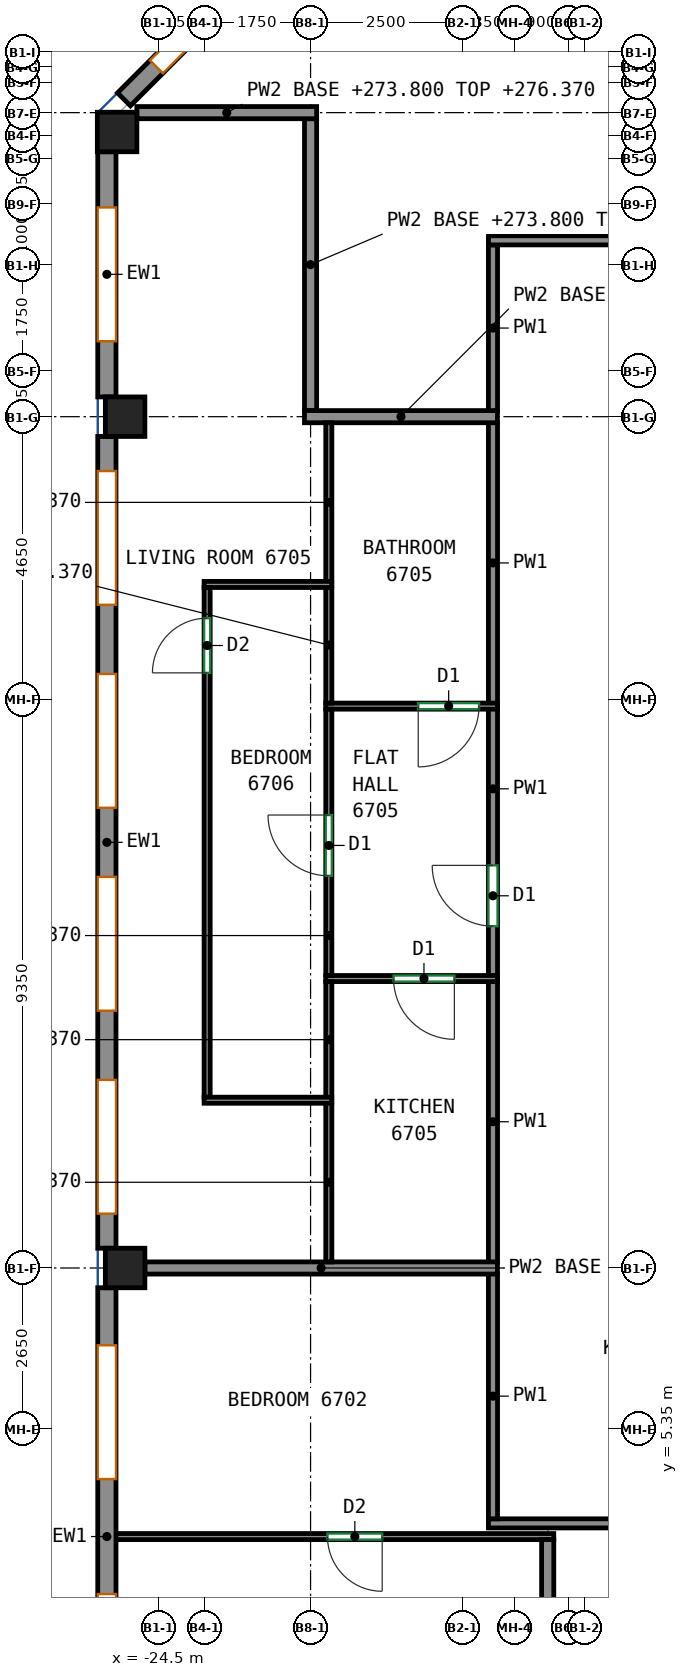
"""IFC4 building model, lengths in metres.
Left out: names, types, materials, properties, quantities, classifications, styles, units other than length and angle.
Written with IfcOpenShell. Run it as: python <this file> out.ifc"""

import sys

from ifc_helpers import new_model, si_unit, direction, frame, frame_2d, origin, origin_2d, place, context, subcontext, project, spatial, rectangle, extrude, source, transform, mapped, element, fill, save


model = new_model("IFC4")
c1 = context("Model", 3, precision=1e-05, world=origin(), true_north=direction((0.0, 1.0)))
c2 = subcontext(c1, "Body", "Model", "MODEL_VIEW")
j1 = project(units=[si_unit("LENGTHUNIT", "METRE"), si_unit("PLANEANGLEUNIT", "RADIAN")], contexts=[c1])
p1 = place(None, origin())
s1 = spatial("IfcSite", under=j1, at=p1, CompositionType="ELEMENT")
p2 = place(p1, origin())
s2 = spatial("IfcBuilding", under=s1, at=p2, CompositionType="ELEMENT")
p3 = place(p2, frame((0.0, 0.0, 273.8)))
s3 = spatial("IfcBuildingStorey", under=s2, at=p3, CompositionType="ELEMENT", Elevation=273.8)
m1 = source(origin(), c2, "Body", "SweptSolid", [
    extrude(rectangle(XDim=0.65, YDim=0.65, at=origin_2d()), origin(), (0.0, 0.0, 1.0), 3.12),
])
for number, where, z_axis, x_axis in (
    (1, (-25.182, 26.682, 0.0), (0.0, 0.0, 1.0), (1.0, 0.0, 0.0)),
    (2, (-25.05, 8.0, 0.0), (0.0, 0.0, 1.0), (1.0, 0.0, 0.0)),
    (3, (-25.05, 22.0, 0.0), (0.0, 0.0, 1.0), (1.0, 0.0, 0.0)),
):
    element("IfcColumn", number, at=place(p3, frame(where, z_axis=z_axis, x_axis=x_axis)), inside=s3, PredefinedType="COLUMN", context=c2, shape_type="MappedRepresentation", body=[
        mapped(m1, transform((0.0, 0.0, 0.0))),
    ])
m2 = source(origin(), c2, "Body", "SweptSolid", [
    extrude(rectangle(XDim=3.712, YDim=0.3, at=frame_2d((1.856, 0.0))), origin(), (0.0, 0.0, 1.0), 3.12),
])
p4 = place(p3, frame((-22.444, 29.844, 0.0), z_axis=(0.0, 0.0, 1.0), x_axis=(-0.707106781187, -0.707106781187, 0.0)))
e4 = element("IfcWall", 4, at=p4, inside=s3, PredefinedType="SOLIDWALL", context=c2, shape_type="MappedRepresentation", body=[
    mapped(m2, transform((0.0, 0.0, 0.0))),
])
p5 = place(p4, frame((0.756, 0.0, 0.8)))
e5 = element("IfcOpeningElement", 5, at=p5, cuts=e4, PredefinedType="OPENING", context=c2, shape_type="SweptSolid", body=[
    extrude(rectangle(XDim=2.2, YDim=2.05, at=frame_2d((1.1, 1.025))), frame((0.0, 0.16, 0.0), z_axis=(0.0, -1.0, 0.0), x_axis=(1.0, 0.0, 0.0)), (0.0, 0.0, 1.0), 0.32),
])
m3 = source(origin(), c2, "Body", "SweptSolid", [
    extrude(rectangle(XDim=4.032, YDim=0.3, at=frame_2d((2.016, 0.0))), origin(), (0.0, 0.0, 1.0), 3.12),
])
p6 = place(p3, frame((-25.35, 26.357, 0.0), z_axis=(0.0, 0.0, 1.0), x_axis=(0.0, -1.0, 0.0)))
e6 = element("IfcWall", 6, at=p6, inside=s3, PredefinedType="SOLIDWALL", context=c2, shape_type="MappedRepresentation", body=[
    mapped(m3, transform((0.0, 0.0, 0.0))),
])
p7 = place(p6, frame((0.916, 0.0, 0.8)))
e7 = element("IfcOpeningElement", 7, at=p7, cuts=e6, PredefinedType="OPENING", context=c2, shape_type="SweptSolid", body=[
    extrude(rectangle(XDim=2.2, YDim=2.05, at=frame_2d((1.1, 1.025))), frame((0.0, 0.16, 0.0), z_axis=(0.0, -1.0, 0.0), x_axis=(1.0, 0.0, 0.0)), (0.0, 0.0, 1.0), 0.32),
])
m4 = source(origin(), c2, "Body", "SweptSolid", [
    extrude(rectangle(XDim=13.35, YDim=0.3, at=frame_2d((6.675, 0.0))), origin(), (0.0, 0.0, 1.0), 3.12),
])
p8 = place(p3, frame((-25.35, 21.675, 0.0), z_axis=(0.0, 0.0, 1.0), x_axis=(0.0, -1.0, 0.0)))
e8 = element("IfcWall", 8, at=p8, inside=s3, PredefinedType="SOLIDWALL", context=c2, shape_type="MappedRepresentation", body=[
    mapped(m4, transform((0.0, 0.0, 0.0))),
])
p9 = place(p8, frame((0.569, 0.0, 0.8)))
e9 = element("IfcOpeningElement", 9, at=p9, cuts=e8, PredefinedType="OPENING", context=c2, shape_type="SweptSolid", body=[
    extrude(rectangle(XDim=2.2, YDim=2.05, at=frame_2d((1.1, 1.025))), frame((0.0, 0.16, 0.0), z_axis=(0.0, -1.0, 0.0), x_axis=(1.0, 0.0, 0.0)), (0.0, 0.0, 1.0), 0.32),
])
p10 = place(p8, frame((3.906, 0.0, 0.8)))
e10 = element("IfcOpeningElement", 10, at=p10, cuts=e8, PredefinedType="OPENING", context=c2, shape_type="SweptSolid", body=[
    extrude(rectangle(XDim=2.2, YDim=2.05, at=frame_2d((1.1, 1.025))), frame((0.0, 0.16, 0.0), z_axis=(0.0, -1.0, 0.0), x_axis=(1.0, 0.0, 0.0)), (0.0, 0.0, 1.0), 0.32),
])
p11 = place(p8, frame((7.244, 0.0, 0.8)))
e11 = element("IfcOpeningElement", 11, at=p11, cuts=e8, PredefinedType="OPENING", context=c2, shape_type="SweptSolid", body=[
    extrude(rectangle(XDim=2.2, YDim=2.05, at=frame_2d((1.1, 1.025))), frame((0.0, 0.16, 0.0), z_axis=(0.0, -1.0, 0.0), x_axis=(1.0, 0.0, 0.0)), (0.0, 0.0, 1.0), 0.32),
])
p12 = place(p8, frame((10.581, 0.0, 0.8)))
e12 = element("IfcOpeningElement", 12, at=p12, cuts=e8, PredefinedType="OPENING", context=c2, shape_type="SweptSolid", body=[
    extrude(rectangle(XDim=2.2, YDim=2.05, at=frame_2d((1.1, 1.025))), frame((0.0, 0.16, 0.0), z_axis=(0.0, -1.0, 0.0), x_axis=(1.0, 0.0, 0.0)), (0.0, 0.0, 1.0), 0.32),
])
m5 = source(origin(), c2, "Body", "SweptSolid", [
    extrude(rectangle(XDim=8.183, YDim=0.3, at=frame_2d((4.092, 0.0))), origin(), (0.0, 0.0, 1.0), 3.12),
])
p13 = place(p3, frame((-25.35, 7.675, 0.0), z_axis=(0.0, 0.0, 1.0), x_axis=(0.0, -1.0, 0.0)))
e13 = element("IfcWall", 13, at=p13, inside=s3, PredefinedType="SOLIDWALL", context=c2, shape_type="MappedRepresentation", body=[
    mapped(m5, transform((0.0, 0.0, 0.0))),
])
p14 = place(p13, frame((0.946, 0.0, 0.8)))
e14 = element("IfcOpeningElement", 14, at=p14, cuts=e13, PredefinedType="OPENING", context=c2, shape_type="SweptSolid", body=[
    extrude(rectangle(XDim=2.2, YDim=2.05, at=frame_2d((1.1, 1.025))), frame((0.0, 0.16, 0.0), z_axis=(0.0, -1.0, 0.0), x_axis=(1.0, 0.0, 0.0)), (0.0, 0.0, 1.0), 0.32),
])
p15 = place(p13, frame((5.037, 0.0, 0.8)))
e15 = element("IfcOpeningElement", 15, at=p15, cuts=e13, PredefinedType="OPENING", context=c2, shape_type="SweptSolid", body=[
    extrude(rectangle(XDim=2.2, YDim=2.05, at=frame_2d((1.1, 1.025))), frame((0.0, 0.16, 0.0), z_axis=(0.0, -1.0, 0.0), x_axis=(1.0, 0.0, 0.0)), (0.0, 0.0, 1.0), 0.32),
])
p16 = place(p3, frame((-19.075, 3.8, 0.0), z_axis=(0.0, 0.0, 1.0), x_axis=(1.0, 0.0, 0.0)))
e16 = element("IfcWall", 16, at=p16, inside=s3, PredefinedType="PARTITIONING", context=c2, shape_type="SweptSolid", body=[
    extrude(rectangle(XDim=4.89, YDim=0.15, at=frame_2d((2.445, 0.0))), origin(), (0.0, 0.0, 1.0), 3.12),
])
p17 = place(p3, frame((-19.0, 3.875, 0.0), z_axis=(0.0, 0.0, 1.0), x_axis=(0.0, 1.0, 0.0)))
e17 = element("IfcWall", 17, at=p17, inside=s3, PredefinedType="PARTITIONING", context=c2, shape_type="SweptSolid", body=[
    extrude(rectangle(XDim=4.035, YDim=0.15, at=frame_2d((2.018, 0.0))), origin(), (0.0, 0.0, 1.0), 3.12),
])
p18 = place(p3, frame((-19.0, 22.09, 0.0), z_axis=(0.0, 0.0, 1.0), x_axis=(0.0, 1.0, 0.0)))
e18 = element("IfcWall", 18, at=p18, inside=s3, PredefinedType="PARTITIONING", context=c2, shape_type="SweptSolid", body=[
    extrude(rectangle(XDim=2.735, YDim=0.15, at=frame_2d((1.367, 0.0))), origin(), (0.0, 0.0, 1.0), 3.12),
])
p19 = place(p3, frame((-19.075, 24.9, 0.0), z_axis=(0.0, 0.0, 1.0), x_axis=(1.0, 0.0, 0.0)))
e19 = element("IfcWall", 19, at=p19, inside=s3, PredefinedType="PARTITIONING", context=c2, shape_type="SweptSolid", body=[
    extrude(rectangle(XDim=39.75, YDim=0.15, at=frame_2d((19.875, 0.0))), origin(), (0.0, 0.0, 1.0), 3.12),
])
p20 = place(p19, frame((8.674, 0.0, 0.0)))
e20 = element("IfcOpeningElement", 20, at=p20, cuts=e19, PredefinedType="OPENING", context=c2, shape_type="SweptSolid", body=[
    extrude(rectangle(XDim=0.9, YDim=2.1, at=frame_2d((0.45, 1.05))), frame((0.0, 0.085, 0.0), z_axis=(0.0, -1.0, 0.0), x_axis=(1.0, 0.0, 0.0)), (0.0, 0.0, 1.0), 0.17),
])
p21 = place(p19, frame((13.778, 0.0, 0.0)))
e21 = element("IfcOpeningElement", 21, at=p21, cuts=e19, PredefinedType="OPENING", context=c2, shape_type="SweptSolid", body=[
    extrude(rectangle(XDim=0.9, YDim=2.1, at=frame_2d((0.45, 1.05))), frame((0.0, 0.085, 0.0), z_axis=(0.0, -1.0, 0.0), x_axis=(1.0, 0.0, 0.0)), (0.0, 0.0, 1.0), 0.17),
])
p22 = place(p3, frame((-19.0, 8.09, 0.0), z_axis=(0.0, 0.0, 1.0), x_axis=(0.0, 1.0, 0.0)))
e22 = element("IfcWall", 22, at=p22, inside=s3, PredefinedType="PARTITIONING", context=c2, shape_type="SweptSolid", body=[
    extrude(rectangle(XDim=4.63, YDim=0.15, at=frame_2d((2.315, 0.0))), origin(), (0.0, 0.0, 1.0), 3.12),
])
p23 = place(p3, frame((-19.0, 12.8, 0.0), z_axis=(0.0, 0.0, 1.0), x_axis=(0.0, 1.0, 0.0)))
e23 = element("IfcWall", 23, at=p23, inside=s3, PredefinedType="PARTITIONING", context=c2, shape_type="SweptSolid", body=[
    extrude(rectangle(XDim=4.4, YDim=0.15, at=frame_2d((2.2, 0.0))), origin(), (0.0, 0.0, 1.0), 3.12),
])
p24 = place(p23, frame((0.821, 0.0, 0.0)))
e24 = element("IfcOpeningElement", 24, at=p24, cuts=e23, PredefinedType="OPENING", context=c2, shape_type="SweptSolid", body=[
    extrude(rectangle(XDim=1.0, YDim=2.1, at=frame_2d((0.5, 1.05))), frame((0.0, 0.085, 0.0), z_axis=(0.0, -1.0, 0.0), x_axis=(1.0, 0.0, 0.0)), (0.0, 0.0, 1.0), 0.17),
])
p25 = place(p3, frame((-19.0, 17.28, 0.0), z_axis=(0.0, 0.0, 1.0), x_axis=(0.0, 1.0, 0.0)))
e25 = element("IfcWall", 25, at=p25, inside=s3, PredefinedType="PARTITIONING", context=c2, shape_type="SweptSolid", body=[
    extrude(rectangle(XDim=4.63, YDim=0.15, at=frame_2d((2.315, 0.0))), origin(), (0.0, 0.0, 1.0), 3.12),
])
p26 = place(p3, frame((-18.0, 3.583, 0.0), z_axis=(0.0, 0.0, 1.0), x_axis=(-1.0, 0.0, 0.0)))
e26 = element("IfcWall", 26, at=p26, inside=s3, PredefinedType="PARTITIONING", context=c2, shape_type="SweptSolid", body=[
    extrude(rectangle(XDim=7.25, YDim=0.1, at=frame_2d((3.625, 0.0))), origin(), (0.0, 0.0, 1.0), 3.12),
])
p27 = place(p26, frame((2.822, 0.0, 0.0)))
e27 = element("IfcOpeningElement", 27, at=p27, cuts=e26, PredefinedType="OPENING", context=c2, shape_type="SweptSolid", body=[
    extrude(rectangle(XDim=0.9, YDim=2.1, at=frame_2d((0.45, 1.05))), frame((0.0, 0.06, 0.0), z_axis=(0.0, -1.0, 0.0), x_axis=(1.0, 0.0, 0.0)), (0.0, 0.0, 1.0), 0.12),
])
p28 = place(p3, frame((-18.1, -3.148, 0.0), z_axis=(0.0, 0.0, 1.0), x_axis=(0.0, 1.0, 0.0)))
e28 = element("IfcWall", 28, at=p28, inside=s3, PredefinedType="PARTITIONING", context=c2, shape_type="SweptSolid", body=[
    extrude(rectangle(XDim=6.681, YDim=0.2, at=frame_2d((3.34, 0.0))), origin(), (0.0, 0.0, 1.0), 3.12),
])
p29 = place(p3, frame((-24.725, 8.0, 0.0), z_axis=(0.0, 0.0, 1.0), x_axis=(1.0, 0.0, 0.0)))
e29 = element("IfcWall", 29, at=p29, inside=s3, PredefinedType="PARTITIONING", context=c2, shape_type="SweptSolid", body=[
    extrude(rectangle(XDim=5.798, YDim=0.2, at=frame_2d((2.899, 0.0))), origin(), (0.0, 0.0, 1.0), 2.57),
])
p30 = place(p3, frame((-22.0, 22.1, 0.0), z_axis=(0.0, 0.0, 1.0), x_axis=(0.0, 1.0, 0.0)))
e30 = element("IfcWall", 30, at=p30, inside=s3, PredefinedType="PARTITIONING", context=c2, shape_type="SweptSolid", body=[
    extrude(rectangle(XDim=4.8, YDim=0.2, at=frame_2d((2.4, 0.0))), origin(), (0.0, 0.0, 1.0), 2.57),
])
p31 = place(p3, frame((-24.857, 27.0, 0.0), z_axis=(0.0, 0.0, 1.0), x_axis=(1.0, 0.0, 0.0)))
e31 = element("IfcWall", 31, at=p31, inside=s3, PredefinedType="PARTITIONING", context=c2, shape_type="SweptSolid", body=[
    extrude(rectangle(XDim=2.957, YDim=0.2, at=frame_2d((1.479, 0.0))), origin(), (0.0, 0.0, 1.0), 2.57),
])
p32 = place(p3, frame((-22.1, 22.0, 0.0), z_axis=(0.0, 0.0, 1.0), x_axis=(1.0, 0.0, 0.0)))
e32 = element("IfcWall", 32, at=p32, inside=s3, PredefinedType="PARTITIONING", context=c2, shape_type="SweptSolid", body=[
    extrude(rectangle(XDim=3.173, YDim=0.2, at=frame_2d((1.586, 0.0))), origin(), (0.0, 0.0, 1.0), 2.57),
])
p33 = place(p3, frame((-18.927, 12.76, 0.0), z_axis=(0.0, 0.0, 1.0), x_axis=(-1.0, 0.0, 0.0)))
e33 = element("IfcWall", 33, at=p33, inside=s3, PredefinedType="PARTITIONING", context=c2, shape_type="SweptSolid", body=[
    extrude(rectangle(XDim=2.823, YDim=0.1, at=frame_2d((1.412, 0.0))), origin(), (0.0, 0.0, 1.0), 3.12),
])
p34 = place(p33, frame((0.708, 0.0, 0.0)))
e34 = element("IfcOpeningElement", 34, at=p34, cuts=e33, PredefinedType="OPENING", context=c2, shape_type="SweptSolid", body=[
    extrude(rectangle(XDim=1.0, YDim=2.1, at=frame_2d((0.5, 1.05))), frame((0.0, 0.06, 0.0), z_axis=(0.0, -1.0, 0.0), x_axis=(1.0, 0.0, 0.0)), (0.0, 0.0, 1.0), 0.12),
])
p35 = place(p3, frame((-21.7, 8.1, 0.0), z_axis=(0.0, 0.0, 1.0), x_axis=(0.0, 1.0, 0.0)))
e35 = element("IfcWall", 35, at=p35, inside=s3, PredefinedType="PARTITIONING", context=c2, shape_type="SweptSolid", body=[
    extrude(rectangle(XDim=2.619, YDim=0.1, at=frame_2d((1.31, 0.0))), origin(), (0.0, 0.0, 1.0), 2.57),
])
p36 = place(p3, frame((-21.7, 10.8, 0.0), z_axis=(0.0, 0.0, 1.0), x_axis=(0.0, 1.0, 0.0)))
e36 = element("IfcWall", 36, at=p36, inside=s3, PredefinedType="PARTITIONING", context=c2, shape_type="SweptSolid", body=[
    extrude(rectangle(XDim=1.91, YDim=0.1, at=frame_2d((0.955, 0.0))), origin(), (0.0, 0.0, 1.0), 2.57),
])
p37 = place(p3, frame((-18.927, 17.24, 0.0), z_axis=(0.0, 0.0, 1.0), x_axis=(-1.0, 0.0, 0.0)))
e37 = element("IfcWall", 37, at=p37, inside=s3, PredefinedType="PARTITIONING", context=c2, shape_type="SweptSolid", body=[
    extrude(rectangle(XDim=2.823, YDim=0.1, at=frame_2d((1.412, 0.0))), origin(), (0.0, 0.0, 1.0), 3.12),
])
p38 = place(p37, frame((0.302, 0.0, 0.0)))
e38 = element("IfcOpeningElement", 38, at=p38, cuts=e37, PredefinedType="OPENING", context=c2, shape_type="SweptSolid", body=[
    extrude(rectangle(XDim=1.0, YDim=2.1, at=frame_2d((0.5, 1.05))), frame((0.0, 0.06, 0.0), z_axis=(0.0, -1.0, 0.0), x_axis=(1.0, 0.0, 0.0)), (0.0, 0.0, 1.0), 0.12),
])
p39 = place(p3, frame((-21.7, 12.81, 0.0), z_axis=(0.0, 0.0, 1.0), x_axis=(0.0, 1.0, 0.0)))
e39 = element("IfcWall", 39, at=p39, inside=s3, PredefinedType="PARTITIONING", context=c2, shape_type="SweptSolid", body=[
    extrude(rectangle(XDim=4.38, YDim=0.1, at=frame_2d((2.19, 0.0))), origin(), (0.0, 0.0, 1.0), 2.57),
])
p40 = place(p39, frame((1.639, 0.0, 0.0)))
e40 = element("IfcOpeningElement", 40, at=p40, cuts=e39, PredefinedType="OPENING", context=c2, shape_type="SweptSolid", body=[
    extrude(rectangle(XDim=1.0, YDim=2.1, at=frame_2d((0.5, 1.05))), frame((0.0, 0.06, 0.0), z_axis=(0.0, -1.0, 0.0), x_axis=(1.0, 0.0, 0.0)), (0.0, 0.0, 1.0), 0.12),
])
p41 = place(p3, frame((-21.7, 19.281, 0.0), z_axis=(0.0, 0.0, 1.0), x_axis=(0.0, 1.0, 0.0)))
e41 = element("IfcWall", 41, at=p41, inside=s3, PredefinedType="PARTITIONING", context=c2, shape_type="SweptSolid", body=[
    extrude(rectangle(XDim=2.619, YDim=0.1, at=frame_2d((1.31, 0.0))), origin(), (0.0, 0.0, 1.0), 2.57),
])
p42 = place(p3, frame((-21.7, 17.29, 0.0), z_axis=(0.0, 0.0, 1.0), x_axis=(0.0, 1.0, 0.0)))
e42 = element("IfcWall", 42, at=p42, inside=s3, PredefinedType="PARTITIONING", context=c2, shape_type="SweptSolid", body=[
    extrude(rectangle(XDim=1.91, YDim=0.1, at=frame_2d((0.955, 0.0))), origin(), (0.0, 0.0, 1.0), 2.57),
])
p43 = place(p3, frame((-23.751, 19.241, 0.0), z_axis=(0.0, 0.0, 1.0), x_axis=(1.0, 0.0, 0.0)))
e43 = element("IfcWall", 43, at=p43, inside=s3, PredefinedType="PARTITIONING", context=c2, shape_type="SweptSolid", body=[
    extrude(rectangle(XDim=2.099, YDim=0.1, at=frame_2d((1.049, 0.0))), origin(), (0.0, 0.0, 1.0), 3.12),
])
p44 = place(p3, frame((-23.701, 10.809, 0.0), z_axis=(0.0, 0.0, 1.0), x_axis=(0.0, 1.0, 0.0)))
e44 = element("IfcWall", 44, at=p44, inside=s3, PredefinedType="PARTITIONING", context=c2, shape_type="SweptSolid", body=[
    extrude(rectangle(XDim=8.382, YDim=0.1, at=frame_2d((4.191, 0.0))), origin(), (0.0, 0.0, 1.0), 3.12),
])
p45 = place(p44, frame((6.978, 0.0, 0.0)))
e45 = element("IfcOpeningElement", 45, at=p45, cuts=e44, PredefinedType="OPENING", context=c2, shape_type="SweptSolid", body=[
    extrude(rectangle(XDim=0.9, YDim=2.1, at=frame_2d((0.45, 1.05))), frame((0.0, 0.06, 0.0), z_axis=(0.0, -1.0, 0.0), x_axis=(1.0, 0.0, 0.0)), (0.0, 0.0, 1.0), 0.12),
])
p46 = place(p3, frame((-21.652, 10.759, 0.0), z_axis=(0.0, 0.0, 1.0), x_axis=(-1.0, 0.0, 0.0)))
e46 = element("IfcWall", 46, at=p46, inside=s3, PredefinedType="PARTITIONING", context=c2, shape_type="SweptSolid", body=[
    extrude(rectangle(XDim=2.099, YDim=0.1, at=frame_2d((1.049, 0.0))), origin(), (0.0, 0.0, 1.0), 3.12),
])
p47 = place(p5, origin())
e47 = element("IfcWindow", 47, at=p47, inside=s3, PartitioningType="SINGLE_PANEL", PredefinedType="WINDOW", context=c2, shape_type="SweptSolid", body=[
    extrude(rectangle(XDim=2.2, YDim=2.05, at=frame_2d((1.1, 1.025))), frame((0.0, 0.03, 0.0), z_axis=(0.0, -1.0, 0.0), x_axis=(1.0, 0.0, 0.0)), (0.0, 0.0, 1.0), 0.06),
])
fill(e5, e47)
p48 = place(p7, origin())
e48 = element("IfcWindow", 48, at=p48, inside=s3, PartitioningType="SINGLE_PANEL", PredefinedType="WINDOW", context=c2, shape_type="SweptSolid", body=[
    extrude(rectangle(XDim=2.2, YDim=2.05, at=frame_2d((1.1, 1.025))), frame((0.0, 0.03, 0.0), z_axis=(0.0, -1.0, 0.0), x_axis=(1.0, 0.0, 0.0)), (0.0, 0.0, 1.0), 0.06),
])
fill(e7, e48)
p49 = place(p9, origin())
e49 = element("IfcWindow", 49, at=p49, inside=s3, PartitioningType="SINGLE_PANEL", PredefinedType="WINDOW", context=c2, shape_type="SweptSolid", body=[
    extrude(rectangle(XDim=2.2, YDim=2.05, at=frame_2d((1.1, 1.025))), frame((0.0, 0.03, 0.0), z_axis=(0.0, -1.0, 0.0), x_axis=(1.0, 0.0, 0.0)), (0.0, 0.0, 1.0), 0.06),
])
fill(e9, e49)
p50 = place(p10, origin())
e50 = element("IfcWindow", 50, at=p50, inside=s3, PartitioningType="SINGLE_PANEL", PredefinedType="WINDOW", context=c2, shape_type="SweptSolid", body=[
    extrude(rectangle(XDim=2.2, YDim=2.05, at=frame_2d((1.1, 1.025))), frame((0.0, 0.03, 0.0), z_axis=(0.0, -1.0, 0.0), x_axis=(1.0, 0.0, 0.0)), (0.0, 0.0, 1.0), 0.06),
])
fill(e10, e50)
p51 = place(p11, origin())
e51 = element("IfcWindow", 51, at=p51, inside=s3, PartitioningType="SINGLE_PANEL", PredefinedType="WINDOW", context=c2, shape_type="SweptSolid", body=[
    extrude(rectangle(XDim=2.2, YDim=2.05, at=frame_2d((1.1, 1.025))), frame((0.0, 0.03, 0.0), z_axis=(0.0, -1.0, 0.0), x_axis=(1.0, 0.0, 0.0)), (0.0, 0.0, 1.0), 0.06),
])
fill(e11, e51)
p52 = place(p12, origin())
e52 = element("IfcWindow", 52, at=p52, inside=s3, PartitioningType="SINGLE_PANEL", PredefinedType="WINDOW", context=c2, shape_type="SweptSolid", body=[
    extrude(rectangle(XDim=2.2, YDim=2.05, at=frame_2d((1.1, 1.025))), frame((0.0, 0.03, 0.0), z_axis=(0.0, -1.0, 0.0), x_axis=(1.0, 0.0, 0.0)), (0.0, 0.0, 1.0), 0.06),
])
fill(e12, e52)
p53 = place(p14, origin())
e53 = element("IfcWindow", 53, at=p53, inside=s3, PartitioningType="SINGLE_PANEL", PredefinedType="WINDOW", context=c2, shape_type="SweptSolid", body=[
    extrude(rectangle(XDim=2.2, YDim=2.05, at=frame_2d((1.1, 1.025))), frame((0.0, 0.03, 0.0), z_axis=(0.0, -1.0, 0.0), x_axis=(1.0, 0.0, 0.0)), (0.0, 0.0, 1.0), 0.06),
])
fill(e14, e53)
p54 = place(p15, origin())
e54 = element("IfcWindow", 54, at=p54, inside=s3, PartitioningType="SINGLE_PANEL", PredefinedType="WINDOW", context=c2, shape_type="SweptSolid", body=[
    extrude(rectangle(XDim=2.2, YDim=2.05, at=frame_2d((1.1, 1.025))), frame((0.0, 0.03, 0.0), z_axis=(0.0, -1.0, 0.0), x_axis=(1.0, 0.0, 0.0)), (0.0, 0.0, 1.0), 0.06),
])
fill(e15, e54)
p55 = place(p27, origin())
e55 = element("IfcDoor", 55, at=p55, inside=s3, OperationType="SINGLE_SWING_LEFT", PredefinedType="DOOR", context=c2, shape_type="SweptSolid", body=[
    extrude(rectangle(XDim=0.9, YDim=2.1, at=frame_2d((0.45, 1.05))), frame((0.0, 0.025, 0.0), z_axis=(0.0, -1.0, 0.0), x_axis=(1.0, 0.0, 0.0)), (0.0, 0.0, 1.0), 0.05),
])
fill(e27, e55)
p56 = place(p34, origin())
e56 = element("IfcDoor", 56, at=p56, inside=s3, OperationType="SINGLE_SWING_LEFT", PredefinedType="DOOR", context=c2, shape_type="SweptSolid", body=[
    extrude(rectangle(XDim=1.0, YDim=2.1, at=frame_2d((0.5, 1.05))), frame((0.0, 0.025, 0.0), z_axis=(0.0, -1.0, 0.0), x_axis=(1.0, 0.0, 0.0)), (0.0, 0.0, 1.0), 0.05),
])
fill(e34, e56)
p57 = place(p24, origin())
e57 = element("IfcDoor", 57, at=p57, inside=s3, OperationType="SINGLE_SWING_RIGHT", PredefinedType="DOOR", context=c2, shape_type="SweptSolid", body=[
    extrude(rectangle(XDim=1.0, YDim=2.1, at=frame_2d((0.5, 1.05))), frame((0.0, 0.025, 0.0), z_axis=(0.0, -1.0, 0.0), x_axis=(1.0, 0.0, 0.0)), (0.0, 0.0, 1.0), 0.05),
])
fill(e24, e57)
p58 = place(p40, origin())
e58 = element("IfcDoor", 58, at=p58, inside=s3, OperationType="SINGLE_SWING_RIGHT", PredefinedType="DOOR", context=c2, shape_type="SweptSolid", body=[
    extrude(rectangle(XDim=1.0, YDim=2.1, at=frame_2d((0.5, 1.05))), frame((0.0, 0.025, 0.0), z_axis=(0.0, -1.0, 0.0), x_axis=(1.0, 0.0, 0.0)), (0.0, 0.0, 1.0), 0.05),
])
fill(e40, e58)
p59 = place(p38, origin())
e59 = element("IfcDoor", 59, at=p59, inside=s3, OperationType="SINGLE_SWING_RIGHT", PredefinedType="DOOR", context=c2, shape_type="SweptSolid", body=[
    extrude(rectangle(XDim=1.0, YDim=2.1, at=frame_2d((0.5, 1.05))), frame((0.0, 0.025, 0.0), z_axis=(0.0, -1.0, 0.0), x_axis=(1.0, 0.0, 0.0)), (0.0, 0.0, 1.0), 0.05),
])
fill(e38, e59)
p60 = place(p45, origin())
e60 = element("IfcDoor", 60, at=p60, inside=s3, OperationType="SINGLE_SWING_LEFT", PredefinedType="DOOR", context=c2, shape_type="SweptSolid", body=[
    extrude(rectangle(XDim=0.9, YDim=2.1, at=frame_2d((0.45, 1.05))), frame((0.0, 0.025, 0.0), z_axis=(0.0, -1.0, 0.0), x_axis=(1.0, 0.0, 0.0)), (0.0, 0.0, 1.0), 0.05),
])
fill(e45, e60)
save(model, sys.argv[1])
